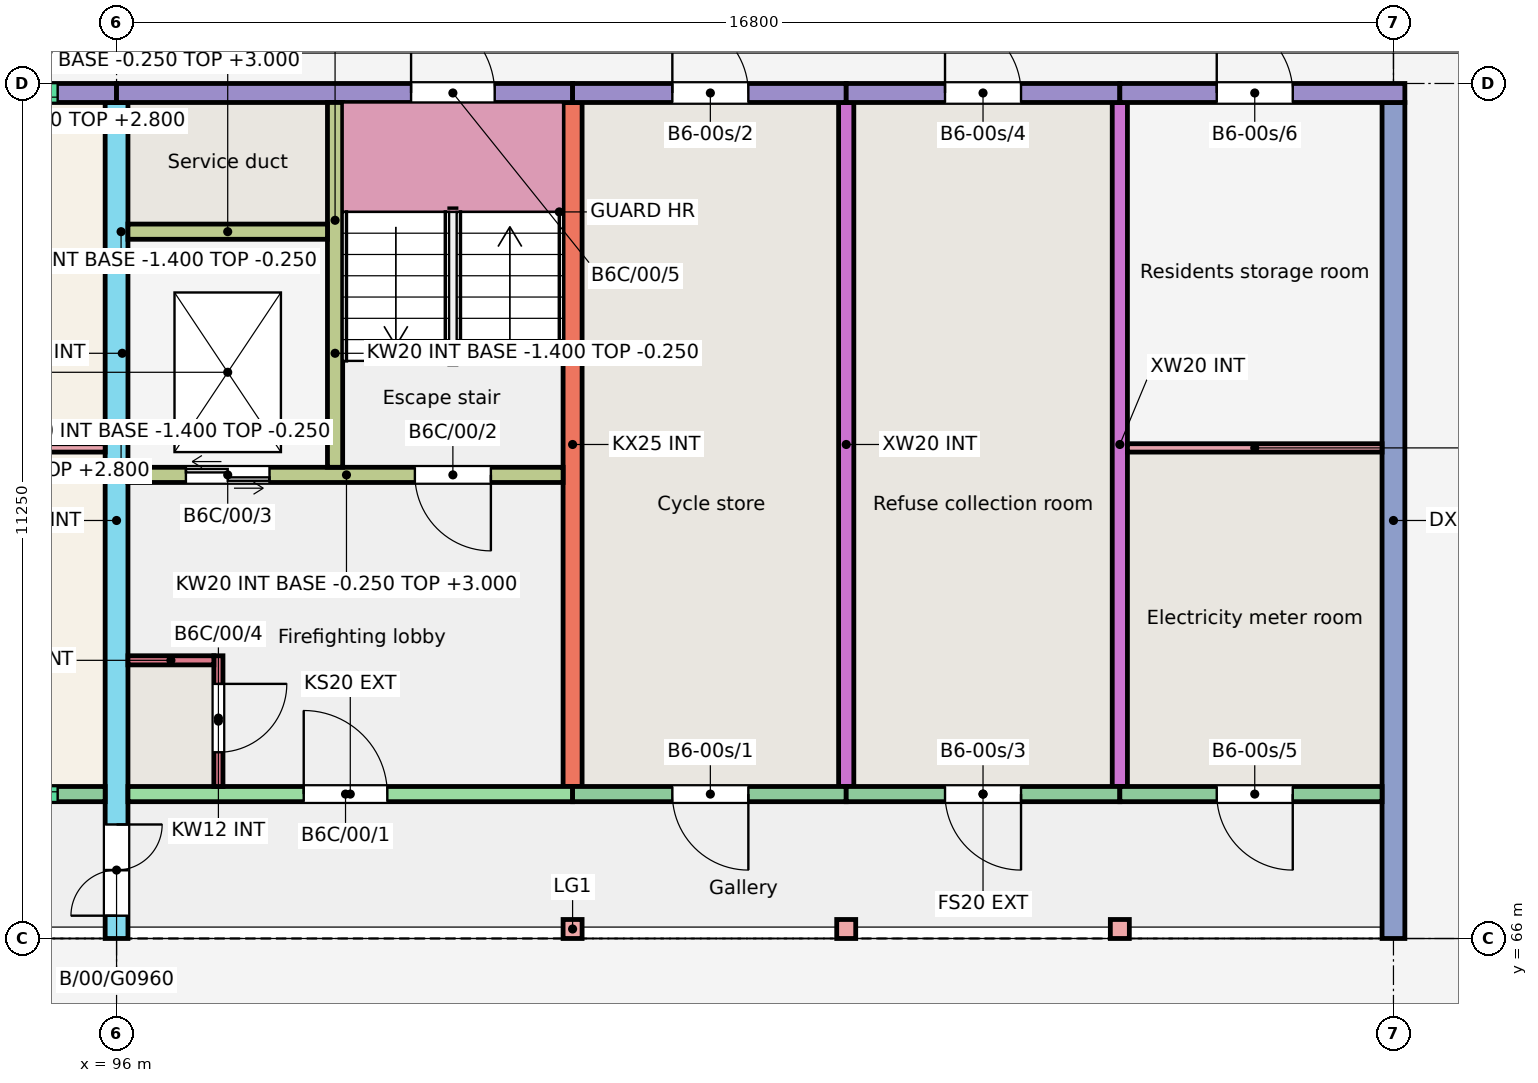
"""IFC4 building model, lengths in metres.
Left out: names, types, materials, properties, quantities, classifications, styles, units other than length and angle.
Written with IfcOpenShell. Run it as: python <this file> out.ifc"""

import sys

from ifc_helpers import new_model, si_unit, direction, frame, frame_2d, origin, origin_2d, place, context, subcontext, project, spatial, rectangle, extrude, element, fill, save


model = new_model("IFC4")
c1 = context("Model", 3, precision=1e-05, world=origin(), true_north=direction((0.0, 1.0)))
c2 = subcontext(c1, "Body", "Model", "MODEL_VIEW")
j1 = project(units=[si_unit("LENGTHUNIT", "METRE"), si_unit("PLANEANGLEUNIT", "RADIAN")], contexts=[c1])
p1 = place(None, origin())
s1 = spatial("IfcSite", under=j1, at=p1, CompositionType="ELEMENT")
p2 = place(p1, origin())
s2 = spatial("IfcBuilding", under=s1, at=p2, CompositionType="ELEMENT")
p3 = place(p2, origin())
s3 = spatial("IfcBuildingStorey", under=s2, at=p3, CompositionType="ELEMENT", Elevation=0.0)
p4 = place(p3, frame((96.0, 66.0, -0.25), z_axis=(0.0, 0.0, 1.0), x_axis=(0.0, 1.0, 0.0)))
e1 = element("IfcWall", 1, at=p4, inside=s3, PredefinedType="SHEAR", context=c2, shape_type="SweptSolid", body=[
    extrude(rectangle(XDim=11.0, YDim=0.3, at=frame_2d((5.5, 0.0))), origin(), (0.0, 0.0, 1.0), 3.25),
])
p5 = place(p4, frame((0.3, 0.0, 0.25)))
e2 = element("IfcOpeningElement", 2, at=p5, cuts=e1, PredefinedType="OPENING", context=c2, shape_type="SweptSolid", body=[
    extrude(rectangle(XDim=1.2, YDim=2.1, at=frame_2d((0.6, 1.05))), frame((0.0, 0.16, 0.0), z_axis=(0.0, -1.0, 0.0), x_axis=(1.0, 0.0, 0.0)), (0.0, 0.0, 1.0), 0.32),
])
p6 = place(p3, frame((102.0, 68.0, -0.25), z_axis=(0.0, 0.0, 1.0), x_axis=(0.0, 1.0, 0.0)))
e3 = element("IfcWall", 3, at=p6, inside=s3, PredefinedType="SHEAR", context=c2, shape_type="SweptSolid", body=[
    extrude(rectangle(XDim=9.0, YDim=0.25, at=frame_2d((4.5, 0.0))), origin(), (0.0, 0.0, 1.0), 3.25),
])
for number, where, z_axis, x_axis in (
    (4, (105.6, 68.0, -0.25), (0.0, 0.0, 1.0), (0.0, 1.0, 0.0)),
    (5, (109.2, 68.0, -0.25), (0.0, 0.0, 1.0), (0.0, 1.0, 0.0)),
):
    element("IfcWall", number, at=place(p3, frame(where, z_axis=z_axis, x_axis=x_axis)), inside=s3, PredefinedType="SHEAR", context=c2, shape_type="SweptSolid", body=[
        extrude(rectangle(XDim=9.0, YDim=0.2, at=frame_2d((4.5, 0.0))), origin(), (0.0, 0.0, 1.0), 3.25),
    ])
p7 = place(p3, frame((112.8, 66.0, -0.25), z_axis=(0.0, 0.0, 1.0), x_axis=(0.0, 1.0, 0.0)))
e6 = element("IfcWall", 6, at=p7, inside=s3, PredefinedType="SHEAR", context=c2, shape_type="SweptSolid", body=[
    extrude(rectangle(XDim=11.0, YDim=0.3, at=frame_2d((5.5, 0.0))), origin(), (0.0, 0.0, 1.0), 3.25),
])
p8 = place(p3, frame((92.4, 77.125, -0.25), z_axis=(0.0, 0.0, 1.0), x_axis=(1.0, 0.0, 0.0)))
e7 = element("IfcWall", 7, at=p8, inside=s3, PredefinedType="SOLIDWALL", context=c2, shape_type="SweptSolid", body=[
    extrude(rectangle(XDim=3.6, YDim=0.25, at=frame_2d((1.8, 0.0))), origin(), (0.0, 0.0, 1.0), 3.25),
])
p9 = place(p8, frame((0.725, 0.0, 1.45)))
e8 = element("IfcOpeningElement", 8, at=p9, cuts=e7, PredefinedType="OPENING", context=c2, shape_type="SweptSolid", body=[
    extrude(rectangle(XDim=2.1, YDim=1.2, at=frame_2d((1.05, 0.6))), frame((0.0, 0.135, 0.0), z_axis=(0.0, -1.0, 0.0), x_axis=(1.0, 0.0, 0.0)), (0.0, 0.0, 1.0), 0.27),
])
p10 = place(p3, frame((92.4, 67.9, -0.25), z_axis=(0.0, 0.0, 1.0), x_axis=(1.0, 0.0, 0.0)))
e9 = element("IfcWall", 9, at=p10, inside=s3, PredefinedType="SOLIDWALL", context=c2, shape_type="SweptSolid", body=[
    extrude(rectangle(XDim=3.45, YDim=0.2, at=frame_2d((1.725, 0.0))), origin(), (0.0, 0.0, 1.0), 3.25),
])
p11 = place(p10, frame((0.725, 0.0, 1.45)))
e10 = element("IfcOpeningElement", 10, at=p11, cuts=e9, PredefinedType="OPENING", context=c2, shape_type="SweptSolid", body=[
    extrude(rectangle(XDim=2.1, YDim=1.2, at=frame_2d((1.05, 0.6))), frame((0.0, 0.11, 0.0), z_axis=(0.0, -1.0, 0.0), x_axis=(1.0, 0.0, 0.0)), (0.0, 0.0, 1.0), 0.22),
])
p12 = place(p3, frame((96.0, 77.125, -0.25), z_axis=(0.0, 0.0, 1.0), x_axis=(1.0, 0.0, 0.0)))
e11 = element("IfcWall", 11, at=p12, inside=s3, PredefinedType="SOLIDWALL", context=c2, shape_type="SweptSolid", body=[
    extrude(rectangle(XDim=6.0, YDim=0.25, at=frame_2d((3.0, 0.0))), origin(), (0.0, 0.0, 1.0), 3.25),
])
p13 = place(p12, frame((3.875, 0.0, 0.25)))
e12 = element("IfcOpeningElement", 12, at=p13, cuts=e11, PredefinedType="OPENING", context=c2, shape_type="SweptSolid", body=[
    extrude(rectangle(XDim=1.1, YDim=2.1, at=frame_2d((0.55, 1.05))), frame((0.0, 0.135, 0.0), z_axis=(0.0, -1.0, 0.0), x_axis=(1.0, 0.0, 0.0)), (0.0, 0.0, 1.0), 0.27),
])
p14 = place(p3, frame((96.15, 67.9, -0.25), z_axis=(0.0, 0.0, 1.0), x_axis=(1.0, 0.0, 0.0)))
e13 = element("IfcWall", 13, at=p14, inside=s3, PredefinedType="SHEAR", context=c2, shape_type="SweptSolid", body=[
    extrude(rectangle(XDim=5.85, YDim=0.2, at=frame_2d((2.925, 0.0))), origin(), (0.0, 0.0, 1.0), 3.25),
])
p15 = place(p14, frame((2.312, 0.0, 0.25)))
e14 = element("IfcOpeningElement", 14, at=p15, cuts=e13, PredefinedType="OPENING", context=c2, shape_type="SweptSolid", body=[
    extrude(rectangle(XDim=1.1, YDim=2.1, at=frame_2d((0.55, 1.05))), frame((0.0, 0.11, 0.0), z_axis=(0.0, -1.0, 0.0), x_axis=(1.0, 0.0, 0.0)), (0.0, 0.0, 1.0), 0.22),
])
p16 = place(p3, frame((96.15, 72.1, -0.25), z_axis=(0.0, 0.0, 1.0), x_axis=(1.0, 0.0, 0.0)))
e15 = element("IfcWall", 15, at=p16, inside=s3, PredefinedType="SHEAR", context=c2, shape_type="SweptSolid", body=[
    extrude(rectangle(XDim=5.725, YDim=0.2, at=frame_2d((2.863, 0.0))), origin(), (0.0, 0.0, 1.0), 3.25),
])
p17 = place(p16, frame((3.775, 0.0, 0.25)))
e16 = element("IfcOpeningElement", 16, at=p17, cuts=e15, PredefinedType="OPENING", context=c2, shape_type="SweptSolid", body=[
    extrude(rectangle(XDim=1.0, YDim=2.1, at=frame_2d((0.5, 1.05))), frame((0.0, 0.11, 0.0), z_axis=(0.0, -1.0, 0.0), x_axis=(1.0, 0.0, 0.0)), (0.0, 0.0, 1.0), 0.22),
])
p18 = place(p16, frame((0.762, 0.0, 0.25)))
e17 = element("IfcOpeningElement", 17, at=p18, cuts=e15, PredefinedType="OPENING", context=c2, shape_type="SweptSolid", body=[
    extrude(rectangle(XDim=1.1, YDim=2.1, at=frame_2d((0.55, 1.05))), frame((0.0, 0.11, 0.0), z_axis=(0.0, -1.0, 0.0), x_axis=(1.0, 0.0, 0.0)), (0.0, 0.0, 1.0), 0.22),
])
p19 = place(p3, frame((98.875, 72.2, -0.25), z_axis=(0.0, 0.0, 1.0), x_axis=(0.0, 1.0, 0.0)))
e18 = element("IfcWall", 18, at=p19, inside=s3, PredefinedType="SHEAR", context=c2, shape_type="SweptSolid", body=[
    extrude(rectangle(XDim=4.8, YDim=0.2, at=frame_2d((2.4, 0.0))), origin(), (0.0, 0.0, 1.0), 3.25),
])
p20 = place(p3, frame((96.15, 75.3, -0.25), z_axis=(0.0, 0.0, 1.0), x_axis=(1.0, 0.0, 0.0)))
e19 = element("IfcWall", 19, at=p20, inside=s3, PredefinedType="SHEAR", context=c2, shape_type="SweptSolid", body=[
    extrude(rectangle(XDim=2.625, YDim=0.2, at=frame_2d((1.312, 0.0))), origin(), (0.0, 0.0, 1.0), 3.25),
])
p21 = place(p3, frame((97.34, 68.0, -0.25), z_axis=(0.0, 0.0, 1.0), x_axis=(0.0, 1.0, 0.0)))
e20 = element("IfcWall", 20, at=p21, inside=s3, PredefinedType="SHEAR", context=c2, shape_type="SweptSolid", body=[
    extrude(rectangle(XDim=1.72, YDim=0.12, at=frame_2d((0.86, 0.0))), origin(), (0.0, 0.0, 1.0), 3.25),
])
p22 = place(p21, frame((0.45, 0.0, 0.25)))
e21 = element("IfcOpeningElement", 21, at=p22, cuts=e20, PredefinedType="OPENING", context=c2, shape_type="SweptSolid", body=[
    extrude(rectangle(XDim=0.9, YDim=2.1, at=frame_2d((0.45, 1.05))), frame((0.0, 0.07, 0.0), z_axis=(0.0, -1.0, 0.0), x_axis=(1.0, 0.0, 0.0)), (0.0, 0.0, 1.0), 0.14),
])
p23 = place(p3, frame((96.15, 69.66, -0.25), z_axis=(0.0, 0.0, 1.0), x_axis=(1.0, 0.0, 0.0)))
e22 = element("IfcWall", 22, at=p23, inside=s3, PredefinedType="SHEAR", context=c2, shape_type="SweptSolid", body=[
    extrude(rectangle(XDim=1.13, YDim=0.12, at=frame_2d((0.565, 0.0))), origin(), (0.0, 0.0, 1.0), 3.25),
])
p24 = place(p3, frame((102.0, 77.125, -0.25), z_axis=(0.0, 0.0, 1.0), x_axis=(1.0, 0.0, 0.0)))
e23 = element("IfcWall", 23, at=p24, inside=s3, PredefinedType="SOLIDWALL", context=c2, shape_type="SweptSolid", body=[
    extrude(rectangle(XDim=3.6, YDim=0.25, at=frame_2d((1.8, 0.0))), origin(), (0.0, 0.0, 1.0), 3.25),
])
p25 = place(p24, frame((1.312, 0.0, 0.25)))
e24 = element("IfcOpeningElement", 24, at=p25, cuts=e23, PredefinedType="OPENING", context=c2, shape_type="SweptSolid", body=[
    extrude(rectangle(XDim=1.0, YDim=2.1, at=frame_2d((0.5, 1.05))), frame((0.0, 0.135, 0.0), z_axis=(0.0, -1.0, 0.0), x_axis=(1.0, 0.0, 0.0)), (0.0, 0.0, 1.0), 0.27),
])
p26 = place(p3, frame((102.0, 67.9, -0.25), z_axis=(0.0, 0.0, 1.0), x_axis=(1.0, 0.0, 0.0)))
e25 = element("IfcWall", 25, at=p26, inside=s3, PredefinedType="SOLIDWALL", context=c2, shape_type="SweptSolid", body=[
    extrude(rectangle(XDim=3.6, YDim=0.2, at=frame_2d((1.8, 0.0))), origin(), (0.0, 0.0, 1.0), 3.25),
])
p27 = place(p26, frame((1.312, 0.0, 0.25)))
e26 = element("IfcOpeningElement", 26, at=p27, cuts=e25, PredefinedType="OPENING", context=c2, shape_type="SweptSolid", body=[
    extrude(rectangle(XDim=1.0, YDim=2.1, at=frame_2d((0.5, 1.05))), frame((0.0, 0.11, 0.0), z_axis=(0.0, -1.0, 0.0), x_axis=(1.0, 0.0, 0.0)), (0.0, 0.0, 1.0), 0.22),
])
p28 = place(p3, frame((105.6, 77.125, -0.25), z_axis=(0.0, 0.0, 1.0), x_axis=(1.0, 0.0, 0.0)))
e27 = element("IfcWall", 27, at=p28, inside=s3, PredefinedType="SOLIDWALL", context=c2, shape_type="SweptSolid", body=[
    extrude(rectangle(XDim=3.6, YDim=0.25, at=frame_2d((1.8, 0.0))), origin(), (0.0, 0.0, 1.0), 3.25),
])
p29 = place(p28, frame((1.3, 0.0, 0.25)))
e28 = element("IfcOpeningElement", 28, at=p29, cuts=e27, PredefinedType="OPENING", context=c2, shape_type="SweptSolid", body=[
    extrude(rectangle(XDim=1.0, YDim=2.1, at=frame_2d((0.5, 1.05))), frame((0.0, 0.135, 0.0), z_axis=(0.0, -1.0, 0.0), x_axis=(1.0, 0.0, 0.0)), (0.0, 0.0, 1.0), 0.27),
])
p30 = place(p3, frame((105.6, 67.9, -0.25), z_axis=(0.0, 0.0, 1.0), x_axis=(1.0, 0.0, 0.0)))
e29 = element("IfcWall", 29, at=p30, inside=s3, PredefinedType="SOLIDWALL", context=c2, shape_type="SweptSolid", body=[
    extrude(rectangle(XDim=3.6, YDim=0.2, at=frame_2d((1.8, 0.0))), origin(), (0.0, 0.0, 1.0), 3.25),
])
p31 = place(p30, frame((1.3, 0.0, 0.25)))
e30 = element("IfcOpeningElement", 30, at=p31, cuts=e29, PredefinedType="OPENING", context=c2, shape_type="SweptSolid", body=[
    extrude(rectangle(XDim=1.0, YDim=2.1, at=frame_2d((0.5, 1.05))), frame((0.0, 0.11, 0.0), z_axis=(0.0, -1.0, 0.0), x_axis=(1.0, 0.0, 0.0)), (0.0, 0.0, 1.0), 0.22),
])
p32 = place(p3, frame((109.2, 77.125, -0.25), z_axis=(0.0, 0.0, 1.0), x_axis=(1.0, 0.0, 0.0)))
e31 = element("IfcWall", 31, at=p32, inside=s3, PredefinedType="SOLIDWALL", context=c2, shape_type="SweptSolid", body=[
    extrude(rectangle(XDim=3.75, YDim=0.25, at=frame_2d((1.875, 0.0))), origin(), (0.0, 0.0, 1.0), 3.25),
])
p33 = place(p32, frame((1.275, 0.0, 0.25)))
e32 = element("IfcOpeningElement", 32, at=p33, cuts=e31, PredefinedType="OPENING", context=c2, shape_type="SweptSolid", body=[
    extrude(rectangle(XDim=1.0, YDim=2.1, at=frame_2d((0.5, 1.05))), frame((0.0, 0.135, 0.0), z_axis=(0.0, -1.0, 0.0), x_axis=(1.0, 0.0, 0.0)), (0.0, 0.0, 1.0), 0.27),
])
p34 = place(p3, frame((109.2, 67.9, -0.25), z_axis=(0.0, 0.0, 1.0), x_axis=(1.0, 0.0, 0.0)))
e33 = element("IfcWall", 33, at=p34, inside=s3, PredefinedType="SOLIDWALL", context=c2, shape_type="SweptSolid", body=[
    extrude(rectangle(XDim=3.45, YDim=0.2, at=frame_2d((1.725, 0.0))), origin(), (0.0, 0.0, 1.0), 3.25),
])
p35 = place(p34, frame((1.275, 0.0, 0.25)))
e34 = element("IfcOpeningElement", 34, at=p35, cuts=e33, PredefinedType="OPENING", context=c2, shape_type="SweptSolid", body=[
    extrude(rectangle(XDim=1.0, YDim=2.1, at=frame_2d((0.5, 1.05))), frame((0.0, 0.11, 0.0), z_axis=(0.0, -1.0, 0.0), x_axis=(1.0, 0.0, 0.0)), (0.0, 0.0, 1.0), 0.22),
])
for number, where, z_axis, x_axis in (
    (35, (102.0, 66.125, -0.25), (0.0, 0.0, 1.0), (1.0, 0.0, 0.0)),
    (36, (105.6, 66.125, -0.25), (0.0, 0.0, 1.0), (1.0, 0.0, 0.0)),
    (37, (109.2, 66.125, -0.25), (0.0, 0.0, 1.0), (1.0, 0.0, 0.0)),
):
    element("IfcColumn", number, at=place(p3, frame(where, z_axis=z_axis, x_axis=x_axis)), inside=s3, PredefinedType="COLUMN", context=c2, shape_type="SweptSolid", body=[
        extrude(rectangle(XDim=0.25, YDim=0.25, at=origin_2d()), origin(), (0.0, 0.0, 1.0), 3.25),
    ])
for number, where, z_axis, x_axis in (
    (38, (96.0, 72.1, -1.4), (0.0, 0.0, 1.0), (1.0, 0.0, 0.0)),
    (39, (96.0, 75.3, -1.4), (0.0, 0.0, 1.0), (1.0, 0.0, 0.0)),
):
    element("IfcWall", number, at=place(p3, frame(where, z_axis=z_axis, x_axis=x_axis)), inside=s3, PredefinedType="SHEAR", context=c2, shape_type="SweptSolid", body=[
        extrude(rectangle(XDim=2.975, YDim=0.2, at=frame_2d((1.488, 0.0))), origin(), (0.0, 0.0, 1.0), 1.15),
    ])
p36 = place(p3, frame((98.875, 72.2, -1.4), z_axis=(0.0, 0.0, 1.0), x_axis=(0.0, 1.0, 0.0)))
e40 = element("IfcWall", 40, at=p36, inside=s3, PredefinedType="SHEAR", context=c2, shape_type="SweptSolid", body=[
    extrude(rectangle(XDim=3.0, YDim=0.2, at=frame_2d((1.5, 0.0))), origin(), (0.0, 0.0, 1.0), 1.15),
])
p37 = place(p3, frame((96.075, 72.2, -1.4), z_axis=(0.0, 0.0, 1.0), x_axis=(0.0, 1.0, 0.0)))
e41 = element("IfcWall", 41, at=p37, inside=s3, PredefinedType="SHEAR", context=c2, shape_type="SweptSolid", body=[
    extrude(rectangle(XDim=3.0, YDim=0.15, at=frame_2d((1.5, 0.0))), origin(), (0.0, 0.0, 1.0), 1.15),
])
p38 = place(p3, frame((92.5, 72.455, 0.0), z_axis=(0.0, 0.0, 1.0), x_axis=(1.0, 0.0, 0.0)))
e42 = element("IfcWall", 42, at=p38, inside=s3, PredefinedType="PARTITIONING", context=c2, shape_type="SweptSolid", body=[
    extrude(rectangle(XDim=3.35, YDim=0.11, at=frame_2d((1.675, 0.0))), origin(), (0.0, 0.0, 1.0), 2.8),
])
p39 = place(p3, frame((109.3, 72.455, 0.0), z_axis=(0.0, 0.0, 1.0), x_axis=(1.0, 0.0, 0.0)))
e43 = element("IfcWall", 43, at=p39, inside=s3, PredefinedType="PARTITIONING", context=c2, shape_type="SweptSolid", body=[
    extrude(rectangle(XDim=3.35, YDim=0.11, at=frame_2d((1.675, 0.0))), origin(), (0.0, 0.0, 1.0), 2.8),
])
p40 = place(p11, origin())
e44 = element("IfcWindow", 44, at=p40, inside=s3, PartitioningType="SINGLE_PANEL", PredefinedType="WINDOW", context=c2, shape_type="SweptSolid", body=[
    extrude(rectangle(XDim=2.1, YDim=1.2, at=frame_2d((1.05, 0.6))), frame((0.0, 0.06, 0.0), z_axis=(0.0, -1.0, 0.0), x_axis=(1.0, 0.0, 0.0)), (0.0, 0.0, 1.0), 0.06),
])
fill(e10, e44)
p41 = place(p9, origin())
e45 = element("IfcWindow", 45, at=p41, inside=s3, PartitioningType="SINGLE_PANEL", PredefinedType="WINDOW", context=c2, shape_type="SweptSolid", body=[
    extrude(rectangle(XDim=2.1, YDim=1.2, at=frame_2d((1.05, 0.6))), frame((0.0, -0.025, 0.0), z_axis=(0.0, -1.0, 0.0), x_axis=(1.0, 0.0, 0.0)), (0.0, 0.0, 1.0), 0.06),
])
fill(e8, e45)
p42 = place(p27, origin())
e46 = element("IfcDoor", 46, at=p42, inside=s3, OperationType="SINGLE_SWING_RIGHT", PredefinedType="DOOR", context=c2, shape_type="SweptSolid", body=[
    extrude(rectangle(XDim=1.0, YDim=2.1, at=frame_2d((0.5, 1.05))), frame((0.0, 0.025, 0.0), z_axis=(0.0, -1.0, 0.0), x_axis=(1.0, 0.0, 0.0)), (0.0, 0.0, 1.0), 0.05),
])
fill(e26, e46)
p43 = place(p25, origin())
e47 = element("IfcDoor", 47, at=p43, inside=s3, OperationType="SINGLE_SWING_LEFT", PredefinedType="DOOR", context=c2, shape_type="SweptSolid", body=[
    extrude(rectangle(XDim=1.0, YDim=2.1, at=frame_2d((0.5, 1.05))), frame((0.0, 0.025, 0.0), z_axis=(0.0, -1.0, 0.0), x_axis=(1.0, 0.0, 0.0)), (0.0, 0.0, 1.0), 0.05),
])
fill(e24, e47)
p44 = place(p31, origin())
e48 = element("IfcDoor", 48, at=p44, inside=s3, OperationType="SINGLE_SWING_RIGHT", PredefinedType="DOOR", context=c2, shape_type="SweptSolid", body=[
    extrude(rectangle(XDim=1.0, YDim=2.1, at=frame_2d((0.5, 1.05))), frame((0.0, 0.025, 0.0), z_axis=(0.0, -1.0, 0.0), x_axis=(1.0, 0.0, 0.0)), (0.0, 0.0, 1.0), 0.05),
])
fill(e30, e48)
p45 = place(p29, origin())
e49 = element("IfcDoor", 49, at=p45, inside=s3, OperationType="SINGLE_SWING_LEFT", PredefinedType="DOOR", context=c2, shape_type="SweptSolid", body=[
    extrude(rectangle(XDim=1.0, YDim=2.1, at=frame_2d((0.5, 1.05))), frame((0.0, 0.025, 0.0), z_axis=(0.0, -1.0, 0.0), x_axis=(1.0, 0.0, 0.0)), (0.0, 0.0, 1.0), 0.05),
])
fill(e28, e49)
p46 = place(p35, origin())
e50 = element("IfcDoor", 50, at=p46, inside=s3, OperationType="SINGLE_SWING_RIGHT", PredefinedType="DOOR", context=c2, shape_type="SweptSolid", body=[
    extrude(rectangle(XDim=1.0, YDim=2.1, at=frame_2d((0.5, 1.05))), frame((0.0, 0.025, 0.0), z_axis=(0.0, -1.0, 0.0), x_axis=(1.0, 0.0, 0.0)), (0.0, 0.0, 1.0), 0.05),
])
fill(e34, e50)
p47 = place(p33, origin())
e51 = element("IfcDoor", 51, at=p47, inside=s3, OperationType="SINGLE_SWING_LEFT", PredefinedType="DOOR", context=c2, shape_type="SweptSolid", body=[
    extrude(rectangle(XDim=1.0, YDim=2.1, at=frame_2d((0.5, 1.05))), frame((0.0, 0.025, 0.0), z_axis=(0.0, -1.0, 0.0), x_axis=(1.0, 0.0, 0.0)), (0.0, 0.0, 1.0), 0.05),
])
fill(e32, e51)
p48 = place(p15, origin())
e52 = element("IfcDoor", 52, at=p48, inside=s3, OperationType="SINGLE_SWING_LEFT", PredefinedType="DOOR", context=c2, shape_type="SweptSolid", body=[
    extrude(rectangle(XDim=1.1, YDim=2.1, at=frame_2d((0.55, 1.05))), frame((0.0, 0.025, 0.0), z_axis=(0.0, -1.0, 0.0), x_axis=(1.0, 0.0, 0.0)), (0.0, 0.0, 1.0), 0.05),
])
fill(e14, e52)
p49 = place(p17, origin())
e53 = element("IfcDoor", 53, at=p49, inside=s3, OperationType="SINGLE_SWING_RIGHT", PredefinedType="DOOR", context=c2, shape_type="SweptSolid", body=[
    extrude(rectangle(XDim=1.0, YDim=2.1, at=frame_2d((0.5, 1.05))), frame((0.0, 0.025, 0.0), z_axis=(0.0, -1.0, 0.0), x_axis=(1.0, 0.0, 0.0)), (0.0, 0.0, 1.0), 0.05),
])
fill(e16, e53)
p50 = place(p18, origin())
e54 = element("IfcDoor", 54, at=p50, inside=s3, OperationType="DOUBLE_DOOR_SLIDING", PredefinedType="DOOR", context=c2, shape_type="SweptSolid", body=[
    extrude(rectangle(XDim=1.1, YDim=2.1, at=frame_2d((0.55, 1.05))), frame((0.0, 0.025, 0.0), z_axis=(0.0, -1.0, 0.0), x_axis=(1.0, 0.0, 0.0)), (0.0, 0.0, 1.0), 0.05),
])
fill(e17, e54)
p51 = place(p22, origin())
e55 = element("IfcDoor", 55, at=p51, inside=s3, OperationType="SINGLE_SWING_RIGHT", PredefinedType="DOOR", context=c2, shape_type="SweptSolid", body=[
    extrude(rectangle(XDim=0.9, YDim=2.1, at=frame_2d((0.45, 1.05))), frame((0.0, 0.025, 0.0), z_axis=(0.0, -1.0, 0.0), x_axis=(1.0, 0.0, 0.0)), (0.0, 0.0, 1.0), 0.05),
])
fill(e21, e55)
p52 = place(p13, origin())
e56 = element("IfcDoor", 56, at=p52, inside=s3, OperationType="SINGLE_SWING_LEFT", PredefinedType="DOOR", context=c2, shape_type="SweptSolid", body=[
    extrude(rectangle(XDim=1.1, YDim=2.1, at=frame_2d((0.55, 1.05))), frame((0.0, 0.025, 0.0), z_axis=(0.0, -1.0, 0.0), x_axis=(1.0, 0.0, 0.0)), (0.0, 0.0, 1.0), 0.05),
])
fill(e12, e56)
p53 = place(p5, origin())
e57 = element("IfcDoor", 57, at=p53, inside=s3, OperationType="DOUBLE_DOOR_SINGLE_SWING", PredefinedType="DOOR", context=c2, shape_type="SweptSolid", body=[
    extrude(rectangle(XDim=1.2, YDim=2.1, at=frame_2d((0.6, 1.05))), frame((0.0, 0.025, 0.0), z_axis=(0.0, -1.0, 0.0), x_axis=(1.0, 0.0, 0.0)), (0.0, 0.0, 1.0), 0.05),
])
fill(e2, e57)
save(model, sys.argv[1])
